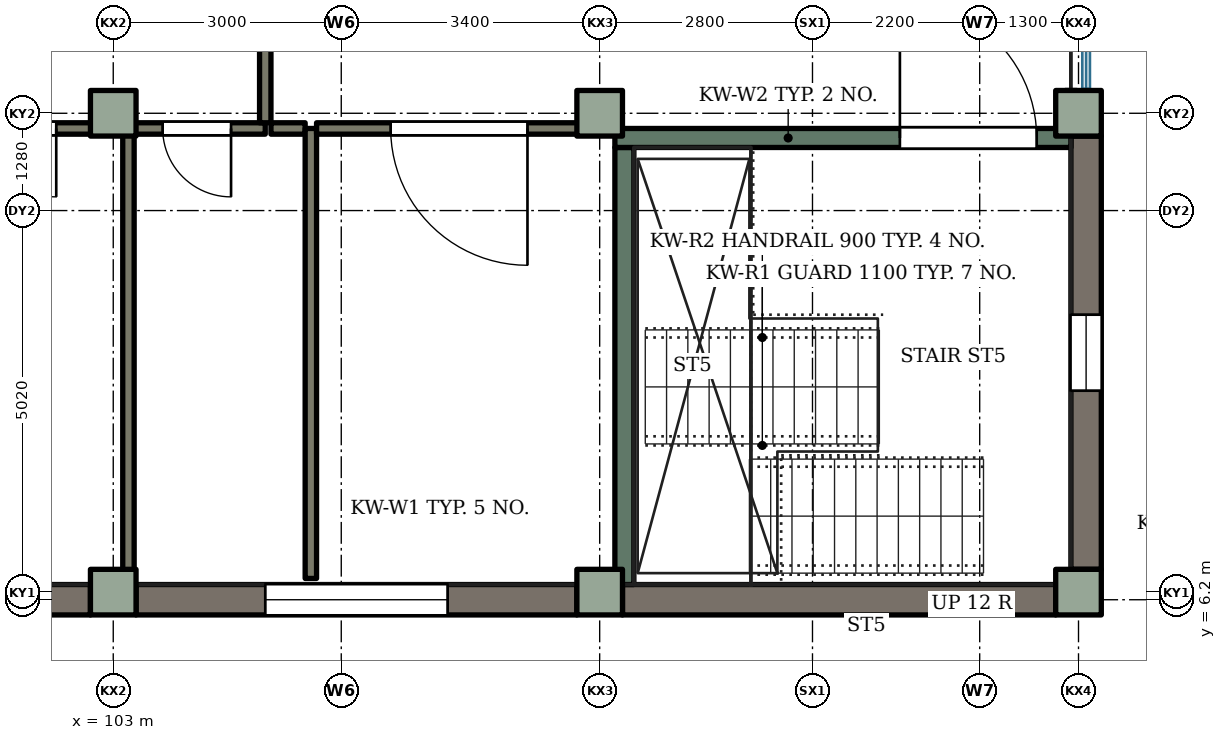
"""IFC4 building model, lengths in metres.
Left out: names, types, materials, properties, quantities, classifications, styles, units other than length and angle.
Written with IfcOpenShell. Run it as: python <this file> out.ifc"""

import sys

from ifc_helpers import new_model, si_unit, direction, frame, frame_2d, origin, origin_2d, place, context, subcontext, project, spatial, rectangle, extrude, element, fill, save


model = new_model("IFC4")
c1 = context("Model", 3, precision=1e-05, world=origin(), true_north=direction((0.0, 1.0)))
c2 = subcontext(c1, "Body", "Model", "MODEL_VIEW")
j1 = project(units=[si_unit("LENGTHUNIT", "METRE"), si_unit("PLANEANGLEUNIT", "RADIAN")], contexts=[c1])
p1 = place(None, origin())
s1 = spatial("IfcSite", under=j1, at=p1, CompositionType="ELEMENT")
p2 = place(p1, origin())
s2 = spatial("IfcBuilding", under=s1, at=p2, CompositionType="ELEMENT")
p3 = place(p2, frame((0.0, 0.0, 4.2)))
s3 = spatial("IfcBuildingStorey", under=s2, at=p3, CompositionType="ELEMENT", Elevation=4.2)
for number, where, z_axis, x_axis in (
    (1, (103.0, 6.3, 0.0), (0.0, 0.0, 1.0), (1.0, 0.0, 0.0)),
    (2, (103.0, 12.6, 0.0), (0.0, 0.0, 1.0), (1.0, 0.0, 0.0)),
    (3, (109.4, 6.3, 0.0), (0.0, 0.0, 1.0), (1.0, 0.0, 0.0)),
    (4, (109.4, 12.6, 0.0), (0.0, 0.0, 1.0), (1.0, 0.0, 0.0)),
    (5, (115.7, 6.3, 0.0), (0.0, 0.0, 1.0), (1.0, 0.0, 0.0)),
    (6, (115.7, 12.6, 0.0), (0.0, 0.0, 1.0), (1.0, 0.0, 0.0)),
):
    element("IfcColumn", number, at=place(p3, frame(where, z_axis=z_axis, x_axis=x_axis)), inside=s3, PredefinedType="COLUMN", context=c2, shape_type="SweptSolid", body=[
        extrude(rectangle(XDim=0.6, YDim=0.6, at=origin_2d()), origin(), (0.0, 0.0, 1.0), 4.2),
    ])
p4 = place(p3, frame((97.0, 6.2, 0.0), z_axis=(0.0, 0.0, 1.0), x_axis=(1.0, 0.0, 0.0)))
e7 = element("IfcWall", 7, at=p4, inside=s3, PredefinedType="SOLIDWALL", context=c2, shape_type="SweptSolid", body=[
    extrude(rectangle(XDim=5.7, YDim=0.4, at=frame_2d((2.85, 0.0))), origin(), (0.0, 0.0, 1.0), 4.2),
])
p5 = place(p4, frame((1.225, 0.0, 1.4)))
e8 = element("IfcOpeningElement", 8, at=p5, cuts=e7, PredefinedType="OPENING", context=c2, shape_type="SweptSolid", body=[
    extrude(rectangle(XDim=0.75, YDim=1.5, at=frame_2d((0.375, 0.75))), frame((0.0, 0.21, 0.0), z_axis=(0.0, -1.0, 0.0), x_axis=(1.0, 0.0, 0.0)), (0.0, 0.0, 1.0), 0.42),
])
p6 = place(p4, frame((4.425, 0.0, 1.4)))
e9 = element("IfcOpeningElement", 9, at=p6, cuts=e7, PredefinedType="OPENING", context=c2, shape_type="SweptSolid", body=[
    extrude(rectangle(XDim=0.75, YDim=1.5, at=frame_2d((0.375, 0.75))), frame((0.0, 0.21, 0.0), z_axis=(0.0, -1.0, 0.0), x_axis=(1.0, 0.0, 0.0)), (0.0, 0.0, 1.0), 0.42),
])
p7 = place(p3, frame((103.3, 6.2, 0.0), z_axis=(0.0, 0.0, 1.0), x_axis=(1.0, 0.0, 0.0)))
e10 = element("IfcWall", 10, at=p7, inside=s3, PredefinedType="SOLIDWALL", context=c2, shape_type="SweptSolid", body=[
    extrude(rectangle(XDim=5.8, YDim=0.4, at=frame_2d((2.9, 0.0))), origin(), (0.0, 0.0, 1.0), 4.2),
])
p8 = place(p7, frame((1.7, 0.0, 0.9)))
e11 = element("IfcOpeningElement", 11, at=p8, cuts=e10, PredefinedType="OPENING", context=c2, shape_type="SweptSolid", body=[
    extrude(rectangle(XDim=2.4, YDim=2.7, at=frame_2d((1.2, 1.35))), frame((0.0, 0.21, 0.0), z_axis=(0.0, -1.0, 0.0), x_axis=(1.0, 0.0, 0.0)), (0.0, 0.0, 1.0), 0.42),
])
p9 = place(p3, frame((109.7, 6.2, 0.0), z_axis=(0.0, 0.0, 1.0), x_axis=(1.0, 0.0, 0.0)))
e12 = element("IfcWall", 12, at=p9, inside=s3, PredefinedType="SOLIDWALL", context=c2, shape_type="SweptSolid", body=[
    extrude(rectangle(XDim=5.7, YDim=0.4, at=frame_2d((2.85, 0.0))), origin(), (0.0, 0.0, 1.0), 4.2),
])
p10 = place(p3, frame((115.8, 12.3, 0.0), z_axis=(0.0, 0.0, 1.0), x_axis=(0.0, -1.0, 0.0)))
e13 = element("IfcWall", 13, at=p10, inside=s3, PredefinedType="SOLIDWALL", context=c2, shape_type="SweptSolid", body=[
    extrude(rectangle(XDim=5.7, YDim=0.4, at=frame_2d((2.85, 0.0))), origin(), (0.0, 0.0, 1.0), 4.2),
])
p11 = place(p10, frame((2.35, 0.0, 0.9)))
e14 = element("IfcOpeningElement", 14, at=p11, cuts=e13, PredefinedType="OPENING", context=c2, shape_type="SweptSolid", body=[
    extrude(rectangle(XDim=1.0, YDim=1.5, at=frame_2d((0.5, 0.75))), frame((0.0, 0.21, 0.0), z_axis=(0.0, -1.0, 0.0), x_axis=(1.0, 0.0, 0.0)), (0.0, 0.0, 1.0), 0.42),
])
p12 = place(p3, frame((109.725, 6.4, 0.0), z_axis=(0.0, 0.0, 1.0), x_axis=(0.0, 1.0, 0.0)))
e15 = element("IfcWall", 15, at=p12, inside=s3, PredefinedType="SHEAR", context=c2, shape_type="SweptSolid", body=[
    extrude(rectangle(XDim=5.75, YDim=0.25, at=frame_2d((2.875, 0.0))), origin(), (0.0, 0.0, 1.0), 4.2),
])
p13 = place(p3, frame((109.6, 12.275, 0.0), z_axis=(0.0, 0.0, 1.0), x_axis=(1.0, 0.0, 0.0)))
e16 = element("IfcWall", 16, at=p13, inside=s3, PredefinedType="SHEAR", context=c2, shape_type="SweptSolid", body=[
    extrude(rectangle(XDim=6.0, YDim=0.25, at=frame_2d((3.0, 0.0))), origin(), (0.0, 0.0, 1.0), 4.2),
])
p14 = place(p13, frame((3.75, 0.0, 0.0)))
e17 = element("IfcOpeningElement", 17, at=p14, cuts=e16, PredefinedType="OPENING", context=c2, shape_type="SweptSolid", body=[
    extrude(rectangle(XDim=1.8, YDim=2.1, at=frame_2d((0.9, 1.05))), frame((0.0, 0.135, 0.0), z_axis=(0.0, -1.0, 0.0), x_axis=(1.0, 0.0, 0.0)), (0.0, 0.0, 1.0), 0.27),
])
p15 = place(p3, frame((102.78, 6.4, 0.0), z_axis=(0.0, 0.0, 1.0), x_axis=(1.0, 0.0, 0.0)))
e18 = element("IfcWall", 18, at=p15, inside=s3, PredefinedType="PARTITIONING", context=c2, shape_type="SweptSolid", body=[
    extrude(rectangle(XDim=0.42, YDim=0.15, at=frame_2d((0.21, 0.0))), origin(), (0.0, 0.0, 1.0), 3.92),
])
p16 = place(p3, frame((103.125, 12.4, 0.0), z_axis=(0.0, 0.0, 1.0), x_axis=(-1.0, 0.0, 0.0)))
e19 = element("IfcWall", 19, at=p16, inside=s3, PredefinedType="PARTITIONING", context=c2, shape_type="SweptSolid", body=[
    extrude(rectangle(XDim=2.65, YDim=0.15, at=frame_2d((1.325, 0.0))), origin(), (0.0, 0.0, 1.0), 3.92),
])
p17 = place(p16, frame((0.875, 0.0, 0.0)))
e20 = element("IfcOpeningElement", 20, at=p17, cuts=e19, PredefinedType="OPENING", context=c2, shape_type="SweptSolid", body=[
    extrude(rectangle(XDim=0.9, YDim=2.1, at=frame_2d((0.45, 1.05))), frame((0.0, 0.085, 0.0), z_axis=(0.0, -1.0, 0.0), x_axis=(1.0, 0.0, 0.0)), (0.0, 0.0, 1.0), 0.17),
])
p18 = place(p3, frame((103.2, 6.475, 0.0), z_axis=(0.0, 0.0, 1.0), x_axis=(0.0, 1.0, 0.0)))
e21 = element("IfcWall", 21, at=p18, inside=s3, PredefinedType="PARTITIONING", context=c2, shape_type="SweptSolid", body=[
    extrude(rectangle(XDim=5.925, YDim=0.15, at=frame_2d((2.962, 0.0))), origin(), (0.0, 0.0, 1.0), 3.92),
])
p19 = place(p3, frame((105.0, 12.4, 0.0), z_axis=(0.0, 0.0, 1.0), x_axis=(-1.0, 0.0, 0.0)))
e22 = element("IfcWall", 22, at=p19, inside=s3, PredefinedType="PARTITIONING", context=c2, shape_type="SweptSolid", body=[
    extrude(rectangle(XDim=1.725, YDim=0.15, at=frame_2d((0.863, 0.0))), origin(), (0.0, 0.0, 1.0), 3.92),
])
p20 = place(p19, frame((0.45, 0.0, 0.0)))
e23 = element("IfcOpeningElement", 23, at=p20, cuts=e22, PredefinedType="OPENING", context=c2, shape_type="SweptSolid", body=[
    extrude(rectangle(XDim=0.9, YDim=2.1, at=frame_2d((0.45, 1.05))), frame((0.0, 0.085, 0.0), z_axis=(0.0, -1.0, 0.0), x_axis=(1.0, 0.0, 0.0)), (0.0, 0.0, 1.0), 0.17),
])
p21 = place(p3, frame((105.0, 12.475, 0.0), z_axis=(0.0, 0.0, 1.0), x_axis=(0.0, 1.0, 0.0)))
e24 = element("IfcWall", 24, at=p21, inside=s3, PredefinedType="PARTITIONING", context=c2, shape_type="SweptSolid", body=[
    extrude(rectangle(XDim=19.045, YDim=0.15, at=frame_2d((9.522, 0.0))), origin(), (0.0, 0.0, 1.0), 3.92),
])
p22 = place(p21, frame((8.575, 0.0, 0.0)))
e25 = element("IfcOpeningElement", 25, at=p22, cuts=e24, PredefinedType="OPENING", context=c2, shape_type="SweptSolid", body=[
    extrude(rectangle(XDim=1.8, YDim=2.1, at=frame_2d((0.9, 1.05))), frame((0.0, 0.085, 0.0), z_axis=(0.0, -1.0, 0.0), x_axis=(1.0, 0.0, 0.0)), (0.0, 0.0, 1.0), 0.17),
])
p23 = place(p3, frame((105.525, 12.4, 0.0), z_axis=(0.0, 0.0, 1.0), x_axis=(-1.0, 0.0, 0.0)))
e26 = element("IfcWall", 26, at=p23, inside=s3, PredefinedType="PARTITIONING", context=c2, shape_type="SweptSolid", body=[
    extrude(rectangle(XDim=0.45, YDim=0.15, at=frame_2d((0.225, 0.0))), origin(), (0.0, 0.0, 1.0), 3.92),
])
p24 = place(p3, frame((105.6, 6.48, 0.0), z_axis=(0.0, 0.0, 1.0), x_axis=(0.0, 1.0, 0.0)))
e27 = element("IfcWall", 27, at=p24, inside=s3, PredefinedType="PARTITIONING", context=c2, shape_type="SweptSolid", body=[
    extrude(rectangle(XDim=5.92, YDim=0.15, at=frame_2d((2.96, 0.0))), origin(), (0.0, 0.0, 1.0), 3.92),
])
p25 = place(p3, frame((109.18, 6.4, 0.0), z_axis=(0.0, 0.0, 1.0), x_axis=(1.0, 0.0, 0.0)))
e28 = element("IfcWall", 28, at=p25, inside=s3, PredefinedType="PARTITIONING", context=c2, shape_type="SweptSolid", body=[
    extrude(rectangle(XDim=0.34, YDim=0.15, at=frame_2d((0.17, 0.0))), origin(), (0.0, 0.0, 1.0), 3.92),
])
p26 = place(p3, frame((109.52, 12.4, 0.0), z_axis=(0.0, 0.0, 1.0), x_axis=(-1.0, 0.0, 0.0)))
e29 = element("IfcWall", 29, at=p26, inside=s3, PredefinedType="PARTITIONING", context=c2, shape_type="SweptSolid", body=[
    extrude(rectangle(XDim=3.845, YDim=0.15, at=frame_2d((1.922, 0.0))), origin(), (0.0, 0.0, 1.0), 3.92),
])
p27 = place(p26, frame((1.07, 0.0, 0.0)))
e30 = element("IfcOpeningElement", 30, at=p27, cuts=e29, PredefinedType="OPENING", context=c2, shape_type="SweptSolid", body=[
    extrude(rectangle(XDim=1.8, YDim=2.1, at=frame_2d((0.9, 1.05))), frame((0.0, 0.085, 0.0), z_axis=(0.0, -1.0, 0.0), x_axis=(1.0, 0.0, 0.0)), (0.0, 0.0, 1.0), 0.17),
])
p28 = place(p3, frame((115.6, 12.9, 0.0), z_axis=(0.0, 0.0, 1.0), x_axis=(0.0, -1.0, 0.0)))
e31 = element("IfcWall", 31, at=p28, inside=s3, PredefinedType="PARTITIONING", context=c2, shape_type="SweptSolid", body=[
    extrude(rectangle(XDim=0.42, YDim=0.15, at=frame_2d((0.21, 0.0))), origin(), (0.0, 0.0, 1.0), 3.92),
])
p29 = place(p11, origin())
e32 = element("IfcWindow", 32, at=p29, inside=s3, PartitioningType="SINGLE_PANEL", PredefinedType="WINDOW", context=c2, shape_type="SweptSolid", body=[
    extrude(rectangle(XDim=1.0, YDim=1.5, at=frame_2d((0.5, 0.75))), frame((0.0, 0.03, 0.0), z_axis=(0.0, -1.0, 0.0), x_axis=(1.0, 0.0, 0.0)), (0.0, 0.0, 1.0), 0.06),
])
fill(e14, e32)
p30 = place(p8, origin())
e33 = element("IfcWindow", 33, at=p30, inside=s3, PartitioningType="SINGLE_PANEL", PredefinedType="WINDOW", context=c2, shape_type="SweptSolid", body=[
    extrude(rectangle(XDim=2.4, YDim=2.7, at=frame_2d((1.2, 1.35))), frame((0.0, 0.03, 0.0), z_axis=(0.0, -1.0, 0.0), x_axis=(1.0, 0.0, 0.0)), (0.0, 0.0, 1.0), 0.06),
])
fill(e11, e33)
p31 = place(p17, origin())
e34 = element("IfcDoor", 34, at=p31, inside=s3, OperationType="SINGLE_SWING_LEFT", PredefinedType="DOOR", context=c2, shape_type="SweptSolid", body=[
    extrude(rectangle(XDim=0.9, YDim=2.1, at=frame_2d((0.45, 1.05))), frame((0.0, 0.025, 0.0), z_axis=(0.0, -1.0, 0.0), x_axis=(1.0, 0.0, 0.0)), (0.0, 0.0, 1.0), 0.05),
])
fill(e20, e34)
p32 = place(p20, origin())
e35 = element("IfcDoor", 35, at=p32, inside=s3, OperationType="SINGLE_SWING_LEFT", PredefinedType="DOOR", context=c2, shape_type="SweptSolid", body=[
    extrude(rectangle(XDim=0.9, YDim=2.1, at=frame_2d((0.45, 1.05))), frame((0.0, 0.025, 0.0), z_axis=(0.0, -1.0, 0.0), x_axis=(1.0, 0.0, 0.0)), (0.0, 0.0, 1.0), 0.05),
])
fill(e23, e35)
p33 = place(p27, origin())
e36 = element("IfcDoor", 36, at=p33, inside=s3, OperationType="DOUBLE_DOOR_SINGLE_SWING", PredefinedType="DOOR", context=c2, shape_type="SweptSolid", body=[
    extrude(rectangle(XDim=1.8, YDim=2.1, at=frame_2d((0.9, 1.05))), frame((0.0, 0.025, 0.0), z_axis=(0.0, -1.0, 0.0), x_axis=(1.0, 0.0, 0.0)), (0.0, 0.0, 1.0), 0.05),
])
fill(e30, e36)
p34 = place(p14, origin())
e37 = element("IfcDoor", 37, at=p34, inside=s3, OperationType="DOUBLE_DOOR_SINGLE_SWING", PredefinedType="DOOR", context=c2, shape_type="SweptSolid", body=[
    extrude(rectangle(XDim=1.8, YDim=2.1, at=frame_2d((0.9, 1.05))), frame((0.0, 0.025, 0.0), z_axis=(0.0, -1.0, 0.0), x_axis=(1.0, 0.0, 0.0)), (0.0, 0.0, 1.0), 0.05),
])
fill(e17, e37)
save(model, sys.argv[1])
